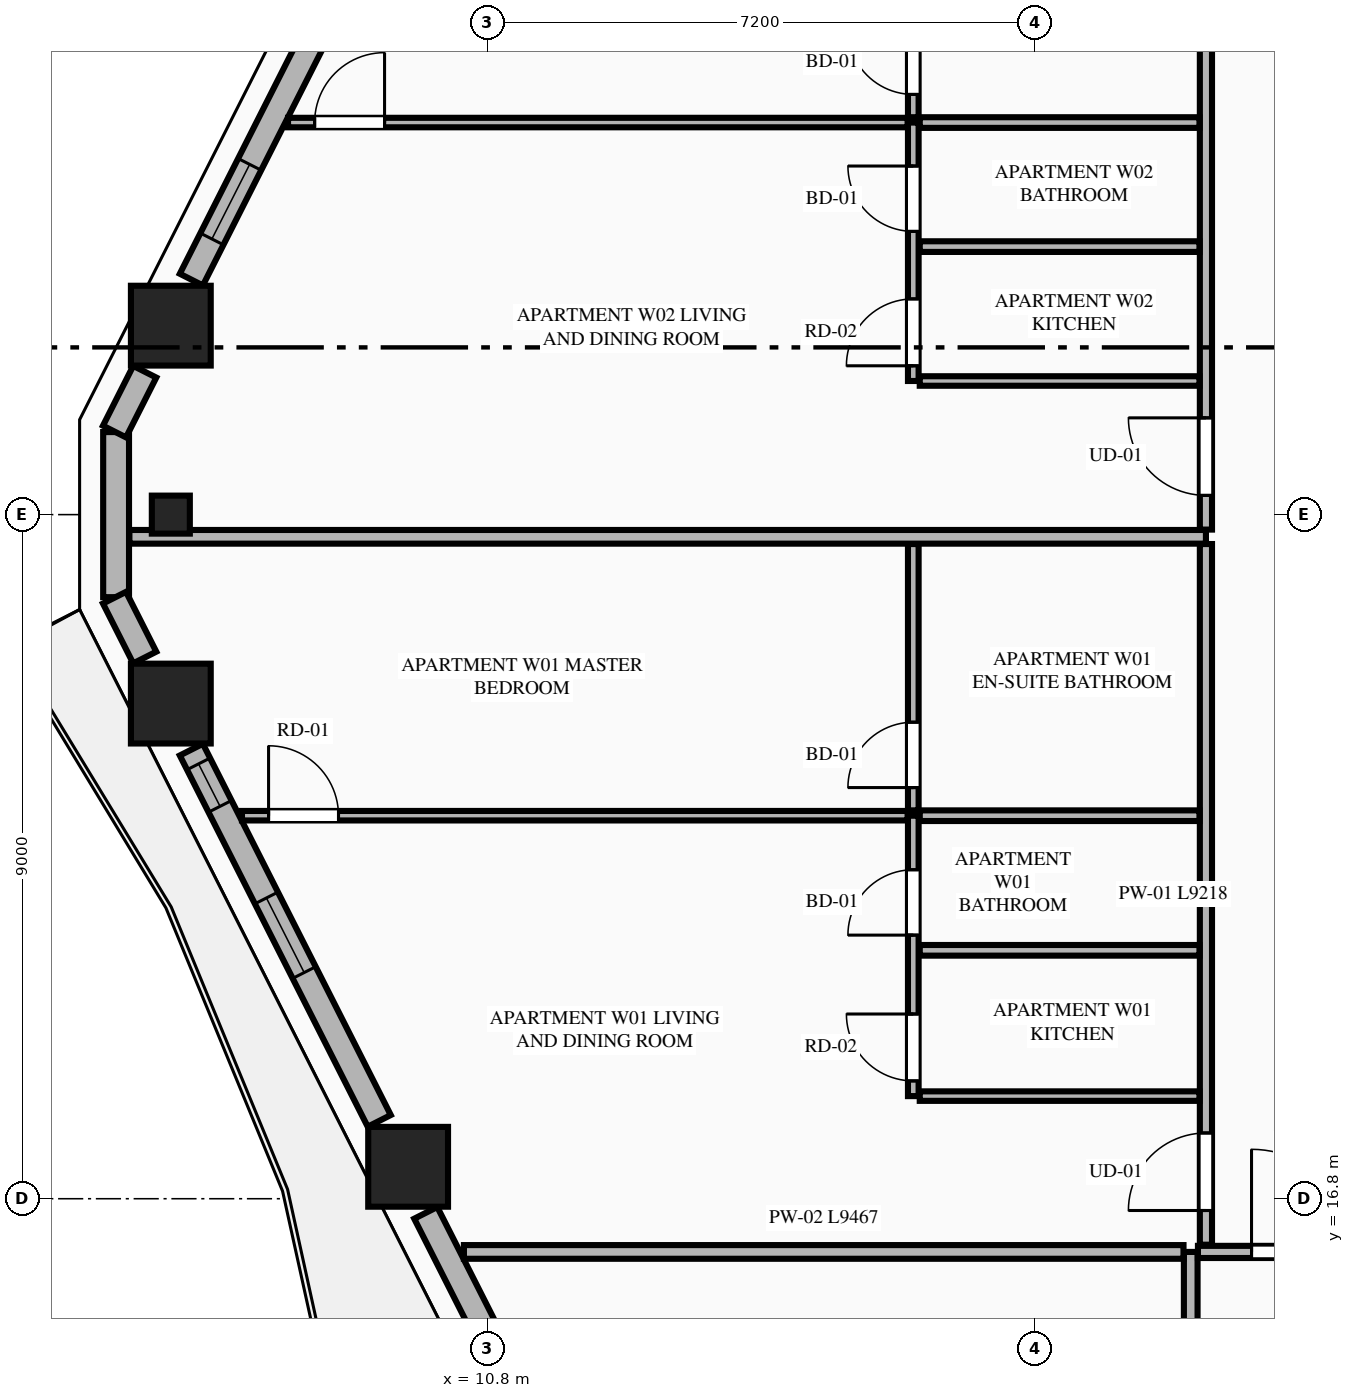
"""IFC4 building model, lengths in metres.
Left out: names, types, materials, properties, quantities, classifications, styles, units other than length and angle.
Written with IfcOpenShell. Run it as: python <this file> out.ifc"""

import sys

from ifc_helpers import new_model, si_unit, direction, frame, frame_2d, origin, origin_2d, place, context, subcontext, project, spatial, rectangle, extrude, element, fill, save


model = new_model("IFC4")
c1 = context("Model", 3, precision=1e-05, world=origin(), true_north=direction((0.0, 1.0)))
c2 = subcontext(c1, "Body", "Model", "MODEL_VIEW")
j1 = project(units=[si_unit("LENGTHUNIT", "METRE"), si_unit("PLANEANGLEUNIT", "RADIAN")], contexts=[c1])
p1 = place(None, origin())
s1 = spatial("IfcSite", under=j1, at=p1, CompositionType="ELEMENT")
p2 = place(p1, origin())
s2 = spatial("IfcBuilding", under=s1, at=p2, CompositionType="ELEMENT")
p3 = place(p2, frame((0.0, 0.0, 87.1)))
s3 = spatial("IfcBuildingStorey", under=s2, at=p3, CompositionType="ELEMENT", Elevation=87.1)
for number, where, z_axis, x_axis in (
    (1, (6.632, 28.286, 0.0), (0.0, 0.0, 1.0), (1.0, 0.0, 0.0)),
    (2, (6.632, 23.314, 0.0), (0.0, 0.0, 1.0), (1.0, 0.0, 0.0)),
    (3, (9.754, 17.22, 0.0), (0.0, 0.0, 1.0), (1.0, 0.0, 0.0)),
):
    element("IfcColumn", number, at=place(p3, frame(where, z_axis=z_axis, x_axis=x_axis)), inside=s3, PredefinedType="COLUMN", context=c2, shape_type="SweptSolid", body=[
        extrude(rectangle(XDim=1.05, YDim=1.05, at=origin_2d()), origin(), (0.0, 0.0, 1.0), 3.55),
    ])
p4 = place(p3, frame((6.632, 25.8, 0.0), z_axis=(0.0, 0.0, 1.0), x_axis=(0.0, -1.0, 0.0)))
e4 = element("IfcColumn", 4, at=p4, inside=s3, PredefinedType="PILASTER", context=c2, shape_type="SweptSolid", body=[
    extrude(rectangle(XDim=0.5, YDim=0.35, at=origin_2d()), origin(), (0.0, 0.0, 1.0), 3.55),
])
p5 = place(p3, frame((5.912, 26.886, 0.0), z_axis=(0.0, 0.0, 1.0), x_axis=(0.0, -1.0, 0.0)))
e5 = element("IfcWall", 5, at=p5, inside=s3, PredefinedType="STANDARD", context=c2, shape_type="SweptSolid", body=[
    extrude(rectangle(XDim=2.172, YDim=0.34, at=frame_2d((1.086, 0.0))), origin(), (0.0, 0.0, 1.0), 3.33),
])
p6 = place(p3, frame((9.374, 33.776, 0.0), z_axis=(0.0, 0.0, 1.0), x_axis=(-0.451597066012, -0.892221995901, 0.0)))
e6 = element("IfcWall", 6, at=p6, inside=s3, PredefinedType="STANDARD", context=c2, shape_type="SweptSolid", body=[
    extrude(rectangle(XDim=5.474, YDim=0.34, at=frame_2d((2.737, 0.0))), origin(), (0.0, 0.0, 1.0), 2.787),
])
p7 = place(p6, frame((0.918, 0.0, 0.75)))
e7 = element("IfcOpeningElement", 7, at=p7, cuts=e6, PredefinedType="OPENING", context=c2, shape_type="SweptSolid", body=[
    extrude(rectangle(XDim=1.1, YDim=1.887, at=frame_2d((0.55, 0.943))), frame((0.0, 0.18, 0.0), z_axis=(0.0, -1.0, 0.0), x_axis=(1.0, 0.0, 0.0)), (0.0, 0.0, 1.0), 0.36),
])
p8 = place(p6, frame((3.775, 0.0, 0.75)))
e8 = element("IfcOpeningElement", 8, at=p8, cuts=e6, PredefinedType="OPENING", context=c2, shape_type="SweptSolid", body=[
    extrude(rectangle(XDim=1.1, YDim=1.887, at=frame_2d((0.55, 0.943))), frame((0.0, 0.18, 0.0), z_axis=(0.0, -1.0, 0.0), x_axis=(1.0, 0.0, 0.0)), (0.0, 0.0, 1.0), 0.36),
])
p9 = place(p3, frame((6.289, 27.68, 0.0), z_axis=(0.0, 0.0, 1.0), x_axis=(-0.451306655769, -0.892368927327, 0.0)))
e9 = element("IfcWall", 9, at=p9, inside=s3, PredefinedType="STANDARD", context=c2, shape_type="SweptSolid", body=[
    extrude(rectangle(XDim=0.882, YDim=0.34, at=frame_2d((0.441, 0.0))), origin(), (0.0, 0.0, 1.0), 3.33),
])
p10 = place(p3, frame((5.891, 24.707, 0.0), z_axis=(0.0, 0.0, 1.0), x_axis=(0.451195173259, -0.892425299747, 0.0)))
e10 = element("IfcWall", 10, at=p10, inside=s3, PredefinedType="STANDARD", context=c2, shape_type="SweptSolid", body=[
    extrude(rectangle(XDim=0.882, YDim=0.34, at=frame_2d((0.441, 0.0))), origin(), (0.0, 0.0, 1.0), 3.33),
])
p11 = place(p3, frame((6.902, 22.708, 0.0), z_axis=(0.0, 0.0, 1.0), x_axis=(0.451579095309, -0.892231091523, 0.0)))
e11 = element("IfcWall", 11, at=p11, inside=s3, PredefinedType="STANDARD", context=c2, shape_type="SweptSolid", body=[
    extrude(rectangle(XDim=5.474, YDim=0.34, at=frame_2d((2.737, 0.0))), origin(), (0.0, 0.0, 1.0), 2.787),
])
p12 = place(p11, frame((2.187, 0.0, 0.75)))
e12 = element("IfcOpeningElement", 12, at=p12, cuts=e11, PredefinedType="OPENING", context=c2, shape_type="SweptSolid", body=[
    extrude(rectangle(XDim=1.1, YDim=1.887, at=frame_2d((0.55, 0.943))), frame((0.0, 0.18, 0.0), z_axis=(0.0, -1.0, 0.0), x_axis=(1.0, 0.0, 0.0)), (0.0, 0.0, 1.0), 0.36),
])
p13 = place(p11, frame((0.21, 0.0, 0.75)))
e13 = element("IfcOpeningElement", 13, at=p13, cuts=e11, PredefinedType="OPENING", context=c2, shape_type="SweptSolid", body=[
    extrude(rectangle(XDim=0.626, YDim=1.887, at=frame_2d((0.313, 0.943))), frame((0.0, 0.18, 0.0), z_axis=(0.0, -1.0, 0.0), x_axis=(1.0, 0.0, 0.0)), (0.0, 0.0, 1.0), 0.36),
])
p14 = place(p3, frame((9.986, 16.614, 0.0), z_axis=(0.0, 0.0, 1.0), x_axis=(0.45158267371, -0.892229280401, 0.0)))
e14 = element("IfcWall", 14, at=p14, inside=s3, PredefinedType="STANDARD", context=c2, shape_type="SweptSolid", body=[
    extrude(rectangle(XDim=5.715, YDim=0.34, at=frame_2d((2.857, 0.0))), origin(), (0.0, 0.0, 1.0), 2.787),
])
p15 = place(p14, frame((2.721, 0.0, 0.0)))
e15 = element("IfcOpeningElement", 15, at=p15, cuts=e14, PredefinedType="OPENING", context=c2, shape_type="SweptSolid", body=[
    extrude(rectangle(XDim=1.1, YDim=2.25, at=frame_2d((0.55, 1.125))), frame((0.0, 0.18, 0.0), z_axis=(0.0, -1.0, 0.0), x_axis=(1.0, 0.0, 0.0)), (0.0, 0.0, 1.0), 0.36),
])
p16 = place(p3, frame((20.05, 2.455, 0.0), z_axis=(0.0, 0.0, 1.0), x_axis=(0.0, 1.0, 0.0)))
e16 = element("IfcWall", 16, at=p16, inside=s3, PredefinedType="PARTITIONING", context=c2, shape_type="SweptSolid", body=[
    extrude(rectangle(XDim=13.645, YDim=0.18, at=frame_2d((6.823, 0.0))), origin(), (0.0, 0.0, 1.0), 3.33),
])
p17 = place(p3, frame((20.145, 16.1, 0.0), z_axis=(0.0, 0.0, 1.0), x_axis=(1.0, 0.0, 0.0)))
e17 = element("IfcWall", 17, at=p17, inside=s3, PredefinedType="PARTITIONING", context=c2, shape_type="SweptSolid", body=[
    extrude(rectangle(XDim=16.282, YDim=0.16, at=frame_2d((8.141, 0.0))), origin(), (0.0, 0.0, 1.0), 3.33),
])
p18 = place(p17, frame((0.705, 0.0, 0.0)))
e18 = element("IfcOpeningElement", 18, at=p18, cuts=e17, PredefinedType="OPENING", context=c2, shape_type="SweptSolid", body=[
    extrude(rectangle(XDim=1.35, YDim=2.35, at=frame_2d((0.675, 1.175))), frame((0.0, 0.09, 0.0), z_axis=(0.0, -1.0, 0.0), x_axis=(1.0, 0.0, 0.0)), (0.0, 0.0, 1.0), 0.18),
])
p19 = place(p3, frame((10.488, 16.1, 0.0), z_axis=(0.0, 0.0, 1.0), x_axis=(1.0, 0.0, 0.0)))
e19 = element("IfcWall", 19, at=p19, inside=s3, PredefinedType="PARTITIONING", context=c2, shape_type="SweptSolid", body=[
    extrude(rectangle(XDim=9.467, YDim=0.18, at=frame_2d((4.733, 0.0))), origin(), (0.0, 0.0, 1.0), 3.33),
])
p20 = place(p3, frame((20.25, 16.195, 0.0), z_axis=(0.0, 0.0, 1.0), x_axis=(0.0, 1.0, 0.0)))
e20 = element("IfcWall", 20, at=p20, inside=s3, PredefinedType="PARTITIONING", context=c2, shape_type="SweptSolid", body=[
    extrude(rectangle(XDim=9.218, YDim=0.16, at=frame_2d((4.609, 0.0))), origin(), (0.0, 0.0, 1.0), 2.7),
])
p21 = place(p20, frame((0.45, 0.0, 0.0)))
e21 = element("IfcOpeningElement", 21, at=p21, cuts=e20, PredefinedType="OPENING", context=c2, shape_type="SweptSolid", body=[
    extrude(rectangle(XDim=1.02, YDim=2.25, at=frame_2d((0.51, 1.125))), frame((0.0, 0.09, 0.0), z_axis=(0.0, -1.0, 0.0), x_axis=(1.0, 0.0, 0.0)), (0.0, 0.0, 1.0), 0.18),
])
p22 = place(p3, frame((16.485, 18.15, 0.0), z_axis=(0.0, 0.0, 1.0), x_axis=(1.0, 0.0, 0.0)))
e22 = element("IfcWall", 22, at=p22, inside=s3, PredefinedType="PARTITIONING", context=c2, shape_type="SweptSolid", body=[
    extrude(rectangle(XDim=3.68, YDim=0.125, at=frame_2d((1.84, 0.0))), origin(), (0.0, 0.0, 1.0), 2.7),
])
p23 = place(p3, frame((16.4, 18.15, 0.0), z_axis=(0.0, 0.0, 1.0), x_axis=(0.0, 1.0, 0.0)))
e23 = element("IfcWall", 23, at=p23, inside=s3, PredefinedType="PLUMBINGWALL", context=c2, shape_type="SweptSolid", body=[
    extrude(rectangle(XDim=3.689, YDim=0.14, at=frame_2d((1.845, 0.0))), origin(), (0.0, 0.0, 1.0), 3.33),
])
p24 = place(p23, frame((0.2, 0.0, 0.0)))
e24 = element("IfcOpeningElement", 24, at=p24, cuts=e23, PredefinedType="OPENING", context=c2, shape_type="SweptSolid", body=[
    extrude(rectangle(XDim=0.88, YDim=2.15, at=frame_2d((0.44, 1.075))), frame((0.0, 0.08, 0.0), z_axis=(0.0, -1.0, 0.0), x_axis=(1.0, 0.0, 0.0)), (0.0, 0.0, 1.0), 0.16),
])
p25 = place(p23, frame((2.118, 0.0, 0.0)))
e25 = element("IfcOpeningElement", 25, at=p25, cuts=e23, PredefinedType="OPENING", context=c2, shape_type="SweptSolid", body=[
    extrude(rectangle(XDim=0.86, YDim=2.1, at=frame_2d((0.43, 1.05))), frame((0.0, 0.08, 0.0), z_axis=(0.0, -1.0, 0.0), x_axis=(1.0, 0.0, 0.0)), (0.0, 0.0, 1.0), 0.16),
])
p26 = place(p3, frame((16.4, 21.909, 0.0), z_axis=(0.0, 0.0, 1.0), x_axis=(0.0, 1.0, 0.0)))
e26 = element("IfcWall", 26, at=p26, inside=s3, PredefinedType="PLUMBINGWALL", context=c2, shape_type="SweptSolid", body=[
    extrude(rectangle(XDim=3.504, YDim=0.14, at=frame_2d((1.752, 0.0))), origin(), (0.0, 0.0, 1.0), 3.33),
])
p27 = place(p26, frame((0.3, 0.0, 0.0)))
e27 = element("IfcOpeningElement", 27, at=p27, cuts=e26, PredefinedType="OPENING", context=c2, shape_type="SweptSolid", body=[
    extrude(rectangle(XDim=0.86, YDim=2.1, at=frame_2d((0.43, 1.05))), frame((0.0, 0.08, 0.0), z_axis=(0.0, -1.0, 0.0), x_axis=(1.0, 0.0, 0.0)), (0.0, 0.0, 1.0), 0.16),
])
p28 = place(p3, frame((16.485, 21.839, 0.0), z_axis=(0.0, 0.0, 1.0), x_axis=(1.0, 0.0, 0.0)))
e28 = element("IfcWall", 28, at=p28, inside=s3, PredefinedType="PLUMBINGWALL", context=c2, shape_type="SweptSolid", body=[
    extrude(rectangle(XDim=3.68, YDim=0.14, at=frame_2d((1.84, 0.0))), origin(), (0.0, 0.0, 1.0), 3.33),
])
p29 = place(p3, frame((7.568, 21.839, 0.0), z_axis=(0.0, 0.0, 1.0), x_axis=(1.0, 0.0, 0.0)))
e29 = element("IfcWall", 29, at=p29, inside=s3, PredefinedType="PARTITIONING", context=c2, shape_type="SweptSolid", body=[
    extrude(rectangle(XDim=8.757, YDim=0.125, at=frame_2d((4.378, 0.0))), origin(), (0.0, 0.0, 1.0), 3.33),
])
p30 = place(p29, frame((0.35, 0.0, 0.0)))
e30 = element("IfcOpeningElement", 30, at=p30, cuts=e29, PredefinedType="OPENING", context=c2, shape_type="SweptSolid", body=[
    extrude(rectangle(XDim=0.92, YDim=2.15, at=frame_2d((0.46, 1.075))), frame((0.0, 0.073, 0.0), z_axis=(0.0, -1.0, 0.0), x_axis=(1.0, 0.0, 0.0)), (0.0, 0.0, 1.0), 0.145),
])
p31 = place(p3, frame((16.485, 20.068, 0.0), z_axis=(0.0, 0.0, 1.0), x_axis=(1.0, 0.0, 0.0)))
e31 = element("IfcWall", 31, at=p31, inside=s3, PredefinedType="PLUMBINGWALL", context=c2, shape_type="SweptSolid", body=[
    extrude(rectangle(XDim=3.68, YDim=0.14, at=frame_2d((1.84, 0.0))), origin(), (0.0, 0.0, 1.0), 3.33),
])
p32 = place(p3, frame((6.087, 25.508, 0.0), z_axis=(0.0, 0.0, 1.0), x_axis=(1.0, 0.0, 0.0)))
e32 = element("IfcWall", 32, at=p32, inside=s3, PredefinedType="PARTITIONING", context=c2, shape_type="SweptSolid", body=[
    extrude(rectangle(XDim=14.163, YDim=0.18, at=frame_2d((7.082, 0.0))), origin(), (0.0, 0.0, 1.0), 3.33),
])
p33 = place(p3, frame((20.25, 25.603, 0.0), z_axis=(0.0, 0.0, 1.0), x_axis=(0.0, 1.0, 0.0)))
e33 = element("IfcWall", 33, at=p33, inside=s3, PredefinedType="PARTITIONING", context=c2, shape_type="SweptSolid", body=[
    extrude(rectangle(XDim=10.002, YDim=0.16, at=frame_2d((5.001, 0.0))), origin(), (0.0, 0.0, 1.0), 2.7),
])
p34 = place(p33, frame((0.45, 0.0, 0.0)))
e34 = element("IfcOpeningElement", 34, at=p34, cuts=e33, PredefinedType="OPENING", context=c2, shape_type="SweptSolid", body=[
    extrude(rectangle(XDim=1.02, YDim=2.25, at=frame_2d((0.51, 1.125))), frame((0.0, 0.09, 0.0), z_axis=(0.0, -1.0, 0.0), x_axis=(1.0, 0.0, 0.0)), (0.0, 0.0, 1.0), 0.18),
])
p35 = place(p3, frame((16.485, 27.558, 0.0), z_axis=(0.0, 0.0, 1.0), x_axis=(1.0, 0.0, 0.0)))
e35 = element("IfcWall", 35, at=p35, inside=s3, PredefinedType="PARTITIONING", context=c2, shape_type="SweptSolid", body=[
    extrude(rectangle(XDim=3.68, YDim=0.125, at=frame_2d((1.84, 0.0))), origin(), (0.0, 0.0, 1.0), 3.33),
])
p36 = place(p3, frame((16.4, 27.558, 0.0), z_axis=(0.0, 0.0, 1.0), x_axis=(0.0, 1.0, 0.0)))
e36 = element("IfcWall", 36, at=p36, inside=s3, PredefinedType="PLUMBINGWALL", context=c2, shape_type="SweptSolid", body=[
    extrude(rectangle(XDim=3.4, YDim=0.14, at=frame_2d((1.7, 0.0))), origin(), (0.0, 0.0, 1.0), 3.33),
])
p37 = place(p36, frame((0.2, 0.0, 0.0)))
e37 = element("IfcOpeningElement", 37, at=p37, cuts=e36, PredefinedType="OPENING", context=c2, shape_type="SweptSolid", body=[
    extrude(rectangle(XDim=0.88, YDim=2.15, at=frame_2d((0.44, 1.075))), frame((0.0, 0.08, 0.0), z_axis=(0.0, -1.0, 0.0), x_axis=(1.0, 0.0, 0.0)), (0.0, 0.0, 1.0), 0.16),
])
p38 = place(p36, frame((1.968, 0.0, 0.0)))
e38 = element("IfcOpeningElement", 38, at=p38, cuts=e36, PredefinedType="OPENING", context=c2, shape_type="SweptSolid", body=[
    extrude(rectangle(XDim=0.86, YDim=2.1, at=frame_2d((0.43, 1.05))), frame((0.0, 0.08, 0.0), z_axis=(0.0, -1.0, 0.0), x_axis=(1.0, 0.0, 0.0)), (0.0, 0.0, 1.0), 0.16),
])
p39 = place(p3, frame((16.4, 31.028, 0.0), z_axis=(0.0, 0.0, 1.0), x_axis=(0.0, 1.0, 0.0)))
e39 = element("IfcWall", 39, at=p39, inside=s3, PredefinedType="PLUMBINGWALL", context=c2, shape_type="SweptSolid", body=[
    extrude(rectangle(XDim=4.577, YDim=0.14, at=frame_2d((2.289, 0.0))), origin(), (0.0, 0.0, 1.0), 3.33),
])
p40 = place(p39, frame((0.3, 0.0, 0.0)))
e40 = element("IfcOpeningElement", 40, at=p40, cuts=e39, PredefinedType="OPENING", context=c2, shape_type="SweptSolid", body=[
    extrude(rectangle(XDim=0.86, YDim=2.1, at=frame_2d((0.43, 1.05))), frame((0.0, 0.08, 0.0), z_axis=(0.0, -1.0, 0.0), x_axis=(1.0, 0.0, 0.0)), (0.0, 0.0, 1.0), 0.16),
])
p41 = place(p3, frame((16.485, 30.958, 0.0), z_axis=(0.0, 0.0, 1.0), x_axis=(1.0, 0.0, 0.0)))
e41 = element("IfcWall", 41, at=p41, inside=s3, PredefinedType="PLUMBINGWALL", context=c2, shape_type="SweptSolid", body=[
    extrude(rectangle(XDim=3.68, YDim=0.14, at=frame_2d((1.84, 0.0))), origin(), (0.0, 0.0, 1.0), 3.33),
])
p42 = place(p3, frame((8.174, 30.958, 0.0), z_axis=(0.0, 0.0, 1.0), x_axis=(1.0, 0.0, 0.0)))
e42 = element("IfcWall", 42, at=p42, inside=s3, PredefinedType="PARTITIONING", context=c2, shape_type="SweptSolid", body=[
    extrude(rectangle(XDim=8.151, YDim=0.125, at=frame_2d((4.075, 0.0))), origin(), (0.0, 0.0, 1.0), 3.33),
])
p43 = place(p42, frame((0.35, 0.0, 0.0)))
e43 = element("IfcOpeningElement", 43, at=p43, cuts=e42, PredefinedType="OPENING", context=c2, shape_type="SweptSolid", body=[
    extrude(rectangle(XDim=0.92, YDim=2.15, at=frame_2d((0.46, 1.075))), frame((0.0, 0.073, 0.0), z_axis=(0.0, -1.0, 0.0), x_axis=(1.0, 0.0, 0.0)), (0.0, 0.0, 1.0), 0.145),
])
p44 = place(p3, frame((16.485, 29.326, 0.0), z_axis=(0.0, 0.0, 1.0), x_axis=(1.0, 0.0, 0.0)))
e44 = element("IfcWall", 44, at=p44, inside=s3, PredefinedType="PLUMBINGWALL", context=c2, shape_type="SweptSolid", body=[
    extrude(rectangle(XDim=3.68, YDim=0.14, at=frame_2d((1.84, 0.0))), origin(), (0.0, 0.0, 1.0), 3.33),
])
p45 = place(p12, origin())
e45 = element("IfcWindow", 45, at=p45, inside=s3, PartitioningType="SINGLE_PANEL", PredefinedType="WINDOW", context=c2, shape_type="SweptSolid", body=[
    extrude(rectangle(XDim=1.1, YDim=1.887, at=frame_2d((0.55, 0.943))), frame((0.0, 0.03, 0.0), z_axis=(0.0, -1.0, 0.0), x_axis=(1.0, 0.0, 0.0)), (0.0, 0.0, 1.0), 0.06),
])
fill(e12, e45)
p46 = place(p18, origin())
e46 = element("IfcDoor", 46, at=p46, inside=s3, OperationType="SINGLE_SWING_LEFT", PredefinedType="DOOR", context=c2, shape_type="SweptSolid", body=[
    extrude(rectangle(XDim=1.35, YDim=2.35, at=frame_2d((0.675, 1.175))), frame((0.0, 0.025, 0.0), z_axis=(0.0, -1.0, 0.0), x_axis=(1.0, 0.0, 0.0)), (0.0, 0.0, 1.0), 0.05),
])
fill(e18, e46)
p47 = place(p24, origin())
e47 = element("IfcDoor", 47, at=p47, inside=s3, OperationType="SINGLE_SWING_RIGHT", PredefinedType="DOOR", context=c2, shape_type="SweptSolid", body=[
    extrude(rectangle(XDim=0.88, YDim=2.15, at=frame_2d((0.44, 1.075))), frame((0.0, 0.025, 0.0), z_axis=(0.0, -1.0, 0.0), x_axis=(1.0, 0.0, 0.0)), (0.0, 0.0, 1.0), 0.05),
])
fill(e24, e47)
p48 = place(p25, origin())
e48 = element("IfcDoor", 48, at=p48, inside=s3, OperationType="SINGLE_SWING_LEFT", PredefinedType="DOOR", context=c2, shape_type="SweptSolid", body=[
    extrude(rectangle(XDim=0.86, YDim=2.1, at=frame_2d((0.43, 1.05))), frame((0.0, 0.025, 0.0), z_axis=(0.0, -1.0, 0.0), x_axis=(1.0, 0.0, 0.0)), (0.0, 0.0, 1.0), 0.05),
])
fill(e25, e48)
p49 = place(p27, origin())
e49 = element("IfcDoor", 49, at=p49, inside=s3, OperationType="SINGLE_SWING_LEFT", PredefinedType="DOOR", context=c2, shape_type="SweptSolid", body=[
    extrude(rectangle(XDim=0.86, YDim=2.1, at=frame_2d((0.43, 1.05))), frame((0.0, 0.025, 0.0), z_axis=(0.0, -1.0, 0.0), x_axis=(1.0, 0.0, 0.0)), (0.0, 0.0, 1.0), 0.05),
])
fill(e27, e49)
p50 = place(p21, origin())
e50 = element("IfcDoor", 50, at=p50, inside=s3, OperationType="SINGLE_SWING_LEFT", PredefinedType="DOOR", context=c2, shape_type="SweptSolid", body=[
    extrude(rectangle(XDim=1.02, YDim=2.25, at=frame_2d((0.51, 1.125))), frame((0.0, 0.025, 0.0), z_axis=(0.0, -1.0, 0.0), x_axis=(1.0, 0.0, 0.0)), (0.0, 0.0, 1.0), 0.05),
])
fill(e21, e50)
p51 = place(p30, origin())
e51 = element("IfcDoor", 51, at=p51, inside=s3, OperationType="SINGLE_SWING_LEFT", PredefinedType="DOOR", context=c2, shape_type="SweptSolid", body=[
    extrude(rectangle(XDim=0.92, YDim=2.15, at=frame_2d((0.46, 1.075))), frame((0.0, 0.025, 0.0), z_axis=(0.0, -1.0, 0.0), x_axis=(1.0, 0.0, 0.0)), (0.0, 0.0, 1.0), 0.05),
])
fill(e30, e51)
p52 = place(p37, origin())
e52 = element("IfcDoor", 52, at=p52, inside=s3, OperationType="SINGLE_SWING_LEFT", PredefinedType="DOOR", context=c2, shape_type="SweptSolid", body=[
    extrude(rectangle(XDim=0.88, YDim=2.15, at=frame_2d((0.44, 1.075))), frame((0.0, 0.025, 0.0), z_axis=(0.0, -1.0, 0.0), x_axis=(1.0, 0.0, 0.0)), (0.0, 0.0, 1.0), 0.05),
])
fill(e37, e52)
p53 = place(p38, origin())
e53 = element("IfcDoor", 53, at=p53, inside=s3, OperationType="SINGLE_SWING_RIGHT", PredefinedType="DOOR", context=c2, shape_type="SweptSolid", body=[
    extrude(rectangle(XDim=0.86, YDim=2.1, at=frame_2d((0.43, 1.05))), frame((0.0, 0.025, 0.0), z_axis=(0.0, -1.0, 0.0), x_axis=(1.0, 0.0, 0.0)), (0.0, 0.0, 1.0), 0.05),
])
fill(e38, e53)
p54 = place(p40, origin())
e54 = element("IfcDoor", 54, at=p54, inside=s3, OperationType="SINGLE_SWING_RIGHT", PredefinedType="DOOR", context=c2, shape_type="SweptSolid", body=[
    extrude(rectangle(XDim=0.86, YDim=2.1, at=frame_2d((0.43, 1.05))), frame((0.0, 0.025, 0.0), z_axis=(0.0, -1.0, 0.0), x_axis=(1.0, 0.0, 0.0)), (0.0, 0.0, 1.0), 0.05),
])
fill(e40, e54)
p55 = place(p34, origin())
e55 = element("IfcDoor", 55, at=p55, inside=s3, OperationType="SINGLE_SWING_RIGHT", PredefinedType="DOOR", context=c2, shape_type="SweptSolid", body=[
    extrude(rectangle(XDim=1.02, YDim=2.25, at=frame_2d((0.51, 1.125))), frame((0.0, 0.025, 0.0), z_axis=(0.0, -1.0, 0.0), x_axis=(1.0, 0.0, 0.0)), (0.0, 0.0, 1.0), 0.05),
])
fill(e34, e55)
p56 = place(p43, origin())
e56 = element("IfcDoor", 56, at=p56, inside=s3, OperationType="SINGLE_SWING_RIGHT", PredefinedType="DOOR", context=c2, shape_type="SweptSolid", body=[
    extrude(rectangle(XDim=0.92, YDim=2.15, at=frame_2d((0.46, 1.075))), frame((0.0, 0.025, 0.0), z_axis=(0.0, -1.0, 0.0), x_axis=(1.0, 0.0, 0.0)), (0.0, 0.0, 1.0), 0.05),
])
fill(e43, e56)
p57 = place(p8, origin())
e57 = element("IfcWindow", 57, at=p57, inside=s3, PartitioningType="SINGLE_PANEL", PredefinedType="WINDOW", context=c2, shape_type="SweptSolid", body=[
    extrude(rectangle(XDim=1.1, YDim=1.887, at=frame_2d((0.55, 0.943))), frame((0.0, 0.03, 0.0), z_axis=(0.0, -1.0, 0.0), x_axis=(1.0, 0.0, 0.0)), (0.0, 0.0, 1.0), 0.06),
])
fill(e8, e57)
p58 = place(p13, origin())
e58 = element("IfcWindow", 58, at=p58, inside=s3, PartitioningType="SINGLE_PANEL", PredefinedType="WINDOW", context=c2, shape_type="SweptSolid", body=[
    extrude(rectangle(XDim=0.626, YDim=1.887, at=frame_2d((0.313, 0.943))), frame((0.0, 0.03, 0.0), z_axis=(0.0, -1.0, 0.0), x_axis=(1.0, 0.0, 0.0)), (0.0, 0.0, 1.0), 0.06),
])
fill(e13, e58)
save(model, sys.argv[1])
